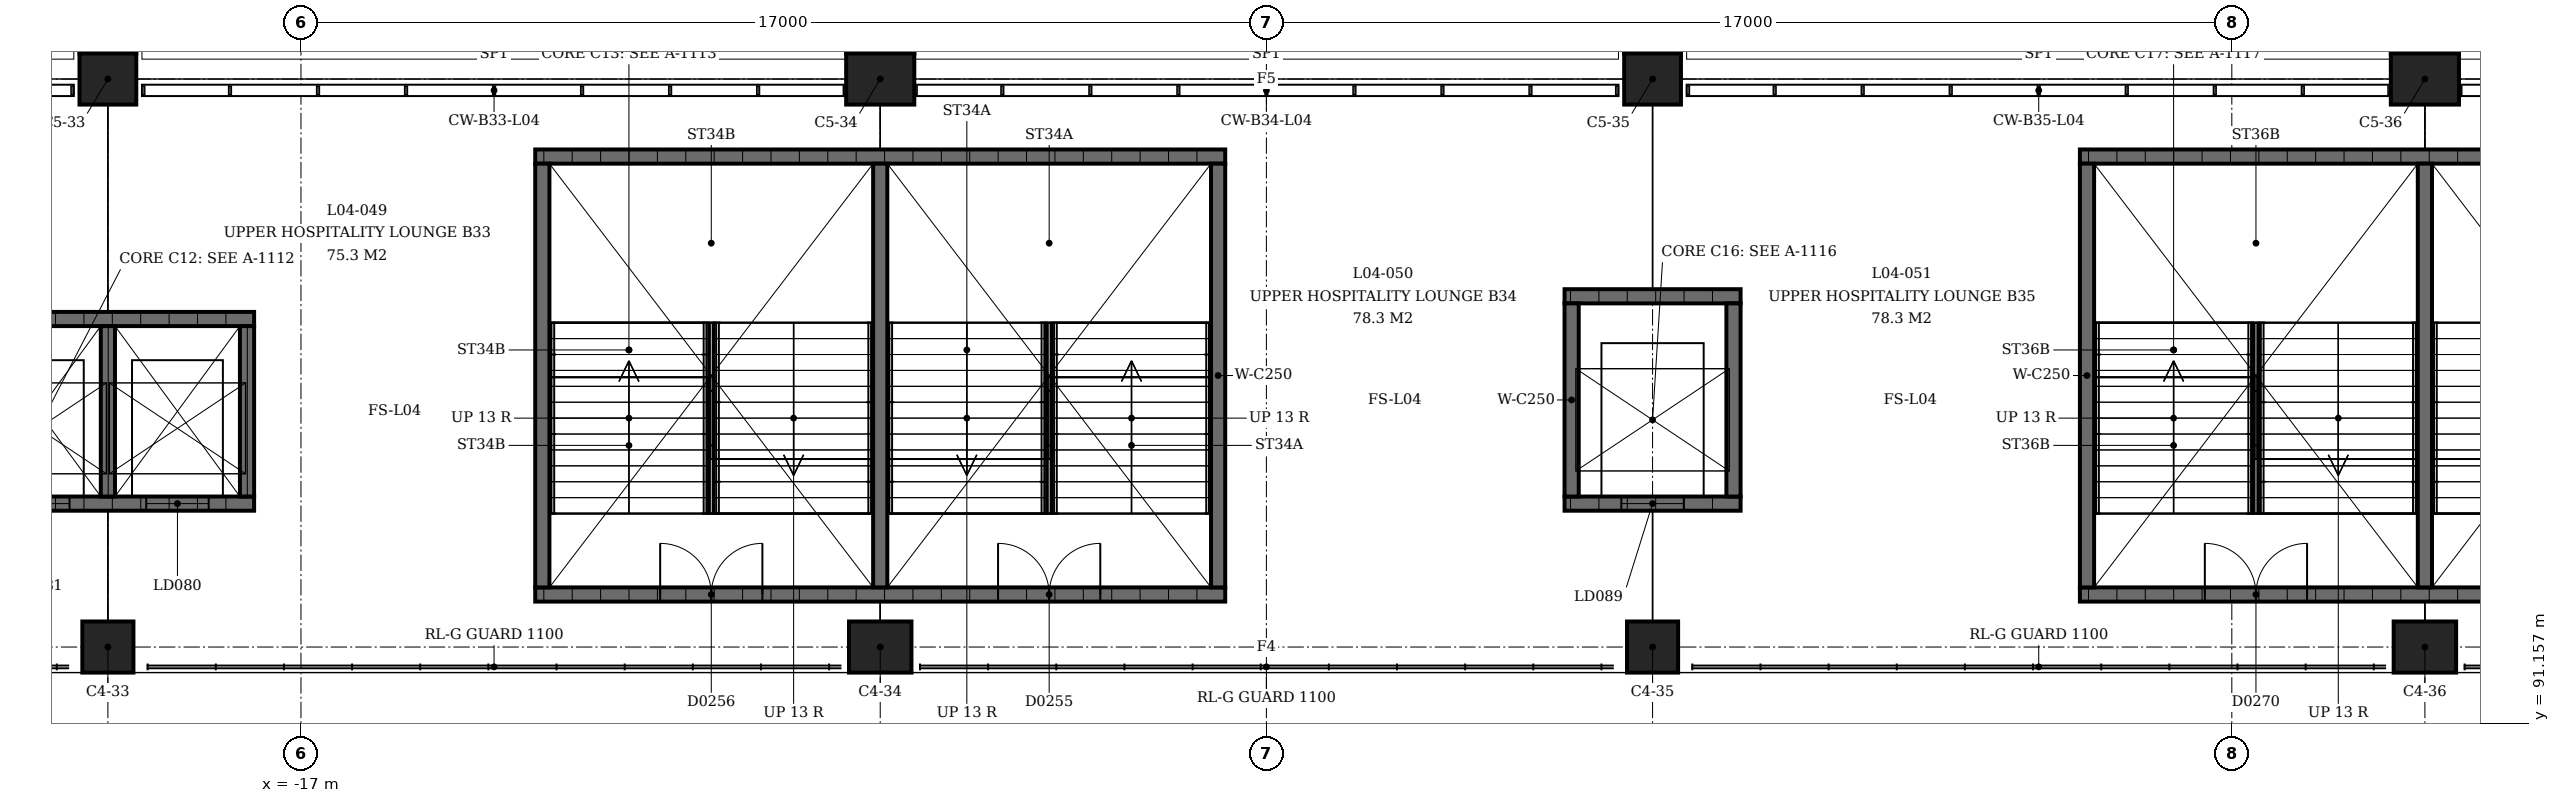
"""IFC4 building model, lengths in metres.
Left out: names, types, materials, properties, quantities, classifications, styles, units other than length and angle.
Written with IfcOpenShell. Run it as: python <this file> out.ifc"""

import sys

from ifc_helpers import new_model, si_unit, direction, frame, frame_2d, origin, origin_2d, place, context, subcontext, project, spatial, rectangle, extrude, element, fill, save


model = new_model("IFC4")
c1 = context("Model", 3, precision=1e-05, world=origin(), true_north=direction((0.0, 1.0)))
c2 = subcontext(c1, "Body", "Model", "MODEL_VIEW")
j1 = project(units=[si_unit("LENGTHUNIT", "METRE"), si_unit("PLANEANGLEUNIT", "RADIAN")], contexts=[c1])
p1 = place(None, origin())
s1 = spatial("IfcSite", under=j1, at=p1, CompositionType="ELEMENT")
p2 = place(p1, origin())
s2 = spatial("IfcBuilding", under=s1, at=p2, CompositionType="ELEMENT")
p3 = place(p2, frame((0.0, 0.0, 18.0)))
s3 = spatial("IfcBuildingStorey", under=s2, at=p3, CompositionType="ELEMENT", Elevation=18.0)
p4 = place(p3, frame((-20.4, 92.5, 0.0), z_axis=(0.0, 0.0, 1.0), x_axis=(-1.0, 0.0, 0.0)))
e1 = element("IfcColumn", 1, at=p4, inside=s3, PredefinedType="COLUMN", context=c2, shape_type="SweptSolid", body=[
    extrude(rectangle(XDim=0.9, YDim=0.9, at=origin_2d()), origin(), (0.0, 0.0, 1.0), 4.5),
])
p5 = place(p3, frame((-20.4, 102.5, 0.0), z_axis=(0.0, 0.0, 1.0), x_axis=(-1.0, 0.0, 0.0)))
e2 = element("IfcColumn", 2, at=p5, inside=s3, PredefinedType="COLUMN", context=c2, shape_type="SweptSolid", body=[
    extrude(rectangle(XDim=1.0, YDim=0.9, at=origin_2d()), origin(), (0.0, 0.0, 1.0), 4.5),
])
p6 = place(p3, frame((-6.8, 92.5, 0.0), z_axis=(0.0, 0.0, 1.0), x_axis=(-1.0, 0.0, 0.0)))
e3 = element("IfcColumn", 3, at=p6, inside=s3, PredefinedType="COLUMN", context=c2, shape_type="SweptSolid", body=[
    extrude(rectangle(XDim=1.1, YDim=0.9, at=origin_2d()), origin(), (0.0, 0.0, 1.0), 4.5),
])
p7 = place(p3, frame((-6.8, 102.5, 0.0), z_axis=(0.0, 0.0, 1.0), x_axis=(-1.0, 0.0, 0.0)))
e4 = element("IfcColumn", 4, at=p7, inside=s3, PredefinedType="COLUMN", context=c2, shape_type="SweptSolid", body=[
    extrude(rectangle(XDim=1.2, YDim=0.9, at=origin_2d()), origin(), (0.0, 0.0, 1.0), 4.5),
])
p8 = place(p3, frame((6.8, 92.5, 0.0), z_axis=(0.0, 0.0, 1.0), x_axis=(-1.0, 0.0, 0.0)))
e5 = element("IfcColumn", 5, at=p8, inside=s3, PredefinedType="COLUMN", context=c2, shape_type="SweptSolid", body=[
    extrude(rectangle(XDim=0.9, YDim=0.9, at=origin_2d()), origin(), (0.0, 0.0, 1.0), 4.5),
])
p9 = place(p3, frame((6.8, 102.5, 0.0), z_axis=(0.0, 0.0, 1.0), x_axis=(-1.0, 0.0, 0.0)))
e6 = element("IfcColumn", 6, at=p9, inside=s3, PredefinedType="COLUMN", context=c2, shape_type="SweptSolid", body=[
    extrude(rectangle(XDim=1.0, YDim=0.9, at=origin_2d()), origin(), (0.0, 0.0, 1.0), 4.5),
])
p10 = place(p3, frame((20.4, 92.5, 0.0), z_axis=(0.0, 0.0, 1.0), x_axis=(-1.0, 0.0, 0.0)))
e7 = element("IfcColumn", 7, at=p10, inside=s3, PredefinedType="COLUMN", context=c2, shape_type="SweptSolid", body=[
    extrude(rectangle(XDim=1.1, YDim=0.9, at=origin_2d()), origin(), (0.0, 0.0, 1.0), 4.5),
])
p11 = place(p3, frame((20.4, 102.5, 0.0), z_axis=(0.0, 0.0, 1.0), x_axis=(-1.0, 0.0, 0.0)))
e8 = element("IfcColumn", 8, at=p11, inside=s3, PredefinedType="COLUMN", context=c2, shape_type="SweptSolid", body=[
    extrude(rectangle(XDim=1.2, YDim=0.9, at=origin_2d()), origin(), (0.0, 0.0, 1.0), 4.5),
])
p12 = place(p3, frame((-0.725, 93.425, 0.0), z_axis=(0.0, 0.0, 1.0), x_axis=(-1.0, 0.0, 0.0)))
e9 = element("IfcWall", 9, at=p12, inside=s3, PredefinedType="SHEAR", context=c2, shape_type="SweptSolid", body=[
    extrude(rectangle(XDim=12.15, YDim=0.25, at=frame_2d((6.075, 0.0))), origin(), (0.0, 0.0, 1.0), 4.09),
])
p13 = place(p12, frame((2.2, 0.0, 0.0)))
e10 = element("IfcOpeningElement", 10, at=p13, cuts=e9, PredefinedType="OPENING", context=c2, shape_type="SweptSolid", body=[
    extrude(rectangle(XDim=1.8, YDim=2.1, at=frame_2d((0.9, 1.05))), frame((0.0, 0.125, 0.0), z_axis=(0.0, -1.0, 0.0), x_axis=(1.0, 0.0, 0.0)), (0.0, 0.0, 1.0), 0.25),
])
p14 = place(p12, frame((8.15, 0.0, 0.0)))
e11 = element("IfcOpeningElement", 11, at=p14, cuts=e9, PredefinedType="OPENING", context=c2, shape_type="SweptSolid", body=[
    extrude(rectangle(XDim=1.8, YDim=2.1, at=frame_2d((0.9, 1.05))), frame((0.0, 0.125, 0.0), z_axis=(0.0, -1.0, 0.0), x_axis=(1.0, 0.0, 0.0)), (0.0, 0.0, 1.0), 0.25),
])
p15 = place(p3, frame((-0.725, 101.135, 0.0), z_axis=(0.0, 0.0, 1.0), x_axis=(-1.0, 0.0, 0.0)))
e12 = element("IfcWall", 12, at=p15, inside=s3, PredefinedType="SHEAR", context=c2, shape_type="SweptSolid", body=[
    extrude(rectangle(XDim=12.15, YDim=0.25, at=frame_2d((6.075, 0.0))), origin(), (0.0, 0.0, 1.0), 4.09),
])
for number, where, z_axis, x_axis in (
    (13, (-0.85, 93.55, 0.0), (0.0, 0.0, 1.0), (0.0, 1.0, 0.0)),
    (14, (-12.75, 93.55, 0.0), (0.0, 0.0, 1.0), (0.0, 1.0, 0.0)),
    (15, (-6.8, 93.55, 0.0), (0.0, 0.0, 1.0), (0.0, 1.0, 0.0)),
):
    element("IfcWall", number, at=place(p3, frame(where, z_axis=z_axis, x_axis=x_axis)), inside=s3, PredefinedType="SHEAR", context=c2, shape_type="SweptSolid", body=[
        extrude(rectangle(XDim=7.46, YDim=0.25, at=frame_2d((3.73, 0.0))), origin(), (0.0, 0.0, 1.0), 4.09),
    ])
p16 = place(p3, frame((26.475, 93.425, 0.0), z_axis=(0.0, 0.0, 1.0), x_axis=(-1.0, 0.0, 0.0)))
e16 = element("IfcWall", 16, at=p16, inside=s3, PredefinedType="SHEAR", context=c2, shape_type="SweptSolid", body=[
    extrude(rectangle(XDim=12.15, YDim=0.25, at=frame_2d((6.075, 0.0))), origin(), (0.0, 0.0, 1.0), 4.09),
])
p17 = place(p16, frame((2.2, 0.0, 0.0)))
e17 = element("IfcOpeningElement", 17, at=p17, cuts=e16, PredefinedType="OPENING", context=c2, shape_type="SweptSolid", body=[
    extrude(rectangle(XDim=1.8, YDim=2.1, at=frame_2d((0.9, 1.05))), frame((0.0, 0.125, 0.0), z_axis=(0.0, -1.0, 0.0), x_axis=(1.0, 0.0, 0.0)), (0.0, 0.0, 1.0), 0.25),
])
p18 = place(p16, frame((8.15, 0.0, 0.0)))
e18 = element("IfcOpeningElement", 18, at=p18, cuts=e16, PredefinedType="OPENING", context=c2, shape_type="SweptSolid", body=[
    extrude(rectangle(XDim=1.8, YDim=2.1, at=frame_2d((0.9, 1.05))), frame((0.0, 0.125, 0.0), z_axis=(0.0, -1.0, 0.0), x_axis=(1.0, 0.0, 0.0)), (0.0, 0.0, 1.0), 0.25),
])
p19 = place(p3, frame((26.475, 101.135, 0.0), z_axis=(0.0, 0.0, 1.0), x_axis=(-1.0, 0.0, 0.0)))
e19 = element("IfcWall", 19, at=p19, inside=s3, PredefinedType="SHEAR", context=c2, shape_type="SweptSolid", body=[
    extrude(rectangle(XDim=12.15, YDim=0.25, at=frame_2d((6.075, 0.0))), origin(), (0.0, 0.0, 1.0), 4.09),
])
for number, where, z_axis, x_axis in (
    (20, (14.45, 93.55, 0.0), (0.0, 0.0, 1.0), (0.0, 1.0, 0.0)),
    (21, (20.4, 93.55, 0.0), (0.0, 0.0, 1.0), (0.0, 1.0, 0.0)),
):
    element("IfcWall", number, at=place(p3, frame(where, z_axis=z_axis, x_axis=x_axis)), inside=s3, PredefinedType="SHEAR", context=c2, shape_type="SweptSolid", body=[
        extrude(rectangle(XDim=7.46, YDim=0.25, at=frame_2d((3.73, 0.0))), origin(), (0.0, 0.0, 1.0), 4.09),
    ])
p20 = place(p3, frame((-17.825, 95.025, 0.0), z_axis=(0.0, 0.0, 1.0), x_axis=(-1.0, 0.0, 0.0)))
e22 = element("IfcWall", 22, at=p20, inside=s3, PredefinedType="SHEAR", context=c2, shape_type="SweptSolid", body=[
    extrude(rectangle(XDim=5.15, YDim=0.25, at=frame_2d((2.575, 0.0))), origin(), (0.0, 0.0, 1.0), 4.09),
])
p21 = place(p20, frame((0.8, 0.0, 0.0)))
e23 = element("IfcOpeningElement", 23, at=p21, cuts=e22, PredefinedType="OPENING", context=c2, shape_type="SweptSolid", body=[
    extrude(rectangle(XDim=1.1, YDim=2.1, at=frame_2d((0.55, 1.05))), frame((0.0, 0.125, 0.0), z_axis=(0.0, -1.0, 0.0), x_axis=(1.0, 0.0, 0.0)), (0.0, 0.0, 1.0), 0.25),
])
p22 = place(p20, frame((3.25, 0.0, 0.0)))
e24 = element("IfcOpeningElement", 24, at=p22, cuts=e22, PredefinedType="OPENING", context=c2, shape_type="SweptSolid", body=[
    extrude(rectangle(XDim=1.1, YDim=2.1, at=frame_2d((0.55, 1.05))), frame((0.0, 0.125, 0.0), z_axis=(0.0, -1.0, 0.0), x_axis=(1.0, 0.0, 0.0)), (0.0, 0.0, 1.0), 0.25),
])
p23 = place(p3, frame((-17.825, 98.275, 0.0), z_axis=(0.0, 0.0, 1.0), x_axis=(-1.0, 0.0, 0.0)))
e25 = element("IfcWall", 25, at=p23, inside=s3, PredefinedType="SHEAR", context=c2, shape_type="SweptSolid", body=[
    extrude(rectangle(XDim=5.15, YDim=0.25, at=frame_2d((2.575, 0.0))), origin(), (0.0, 0.0, 1.0), 4.09),
])
for number, where, z_axis, x_axis in (
    (26, (-17.95, 95.15, 0.0), (0.0, 0.0, 1.0), (0.0, 1.0, 0.0)),
    (27, (-20.4, 95.15, 0.0), (0.0, 0.0, 1.0), (0.0, 1.0, 0.0)),
):
    element("IfcWall", number, at=place(p3, frame(where, z_axis=z_axis, x_axis=x_axis)), inside=s3, PredefinedType="SHEAR", context=c2, shape_type="SweptSolid", body=[
        extrude(rectangle(XDim=3.0, YDim=0.25, at=frame_2d((1.5, 0.0))), origin(), (0.0, 0.0, 1.0), 4.09),
    ])
p24 = place(p3, frame((8.35, 95.025, 0.0), z_axis=(0.0, 0.0, 1.0), x_axis=(-1.0, 0.0, 0.0)))
e28 = element("IfcWall", 28, at=p24, inside=s3, PredefinedType="SHEAR", context=c2, shape_type="SweptSolid", body=[
    extrude(rectangle(XDim=3.1, YDim=0.25, at=frame_2d((1.55, 0.0))), origin(), (0.0, 0.0, 1.0), 4.09),
])
p25 = place(p24, frame((1.0, 0.0, 0.0)))
e29 = element("IfcOpeningElement", 29, at=p25, cuts=e28, PredefinedType="OPENING", context=c2, shape_type="SweptSolid", body=[
    extrude(rectangle(XDim=1.1, YDim=2.1, at=frame_2d((0.55, 1.05))), frame((0.0, 0.125, 0.0), z_axis=(0.0, -1.0, 0.0), x_axis=(1.0, 0.0, 0.0)), (0.0, 0.0, 1.0), 0.25),
])
p26 = place(p3, frame((8.35, 98.675, 0.0), z_axis=(0.0, 0.0, 1.0), x_axis=(-1.0, 0.0, 0.0)))
e30 = element("IfcWall", 30, at=p26, inside=s3, PredefinedType="SHEAR", context=c2, shape_type="SweptSolid", body=[
    extrude(rectangle(XDim=3.1, YDim=0.25, at=frame_2d((1.55, 0.0))), origin(), (0.0, 0.0, 1.0), 4.09),
])
for number, where, z_axis, x_axis in (
    (31, (8.225, 95.15, 0.0), (0.0, 0.0, 1.0), (0.0, 1.0, 0.0)),
    (32, (5.375, 95.15, 0.0), (0.0, 0.0, 1.0), (0.0, 1.0, 0.0)),
):
    element("IfcWall", number, at=place(p3, frame(where, z_axis=z_axis, x_axis=x_axis)), inside=s3, PredefinedType="SHEAR", context=c2, shape_type="SweptSolid", body=[
        extrude(rectangle(XDim=3.4, YDim=0.25, at=frame_2d((1.7, 0.0))), origin(), (0.0, 0.0, 1.0), 4.09),
    ])
p27 = place(p13, origin())
e33 = element("IfcDoor", 33, at=p27, inside=s3, OperationType="DOUBLE_DOOR_SINGLE_SWING", PredefinedType="DOOR", context=c2, shape_type="SweptSolid", body=[
    extrude(rectangle(XDim=1.8, YDim=2.1, at=frame_2d((0.9, 1.05))), frame((0.0, 0.025, 0.0), z_axis=(0.0, -1.0, 0.0), x_axis=(1.0, 0.0, 0.0)), (0.0, 0.0, 1.0), 0.05),
])
fill(e10, e33)
p28 = place(p14, origin())
e34 = element("IfcDoor", 34, at=p28, inside=s3, OperationType="DOUBLE_DOOR_SINGLE_SWING", PredefinedType="DOOR", context=c2, shape_type="SweptSolid", body=[
    extrude(rectangle(XDim=1.8, YDim=2.1, at=frame_2d((0.9, 1.05))), frame((0.0, 0.025, 0.0), z_axis=(0.0, -1.0, 0.0), x_axis=(1.0, 0.0, 0.0)), (0.0, 0.0, 1.0), 0.05),
])
fill(e11, e34)
p29 = place(p18, origin())
e35 = element("IfcDoor", 35, at=p29, inside=s3, OperationType="DOUBLE_DOOR_SINGLE_SWING", PredefinedType="DOOR", context=c2, shape_type="SweptSolid", body=[
    extrude(rectangle(XDim=1.8, YDim=2.1, at=frame_2d((0.9, 1.05))), frame((0.0, 0.025, 0.0), z_axis=(0.0, -1.0, 0.0), x_axis=(1.0, 0.0, 0.0)), (0.0, 0.0, 1.0), 0.05),
])
fill(e18, e35)
p30 = place(p21, origin())
e36 = element("IfcDoor", 36, at=p30, inside=s3, OperationType="SLIDING_TO_LEFT", PredefinedType="DOOR", context=c2, shape_type="SweptSolid", body=[
    extrude(rectangle(XDim=1.1, YDim=2.1, at=frame_2d((0.55, 1.05))), frame((0.0, 0.025, 0.0), z_axis=(0.0, -1.0, 0.0), x_axis=(1.0, 0.0, 0.0)), (0.0, 0.0, 1.0), 0.05),
])
fill(e23, e36)
p31 = place(p22, origin())
e37 = element("IfcDoor", 37, at=p31, inside=s3, OperationType="SLIDING_TO_LEFT", PredefinedType="DOOR", context=c2, shape_type="SweptSolid", body=[
    extrude(rectangle(XDim=1.1, YDim=2.1, at=frame_2d((0.55, 1.05))), frame((0.0, 0.025, 0.0), z_axis=(0.0, -1.0, 0.0), x_axis=(1.0, 0.0, 0.0)), (0.0, 0.0, 1.0), 0.05),
])
fill(e24, e37)
p32 = place(p25, origin())
e38 = element("IfcDoor", 38, at=p32, inside=s3, OperationType="SLIDING_TO_LEFT", PredefinedType="DOOR", context=c2, shape_type="SweptSolid", body=[
    extrude(rectangle(XDim=1.1, YDim=2.1, at=frame_2d((0.55, 1.05))), frame((0.0, 0.025, 0.0), z_axis=(0.0, -1.0, 0.0), x_axis=(1.0, 0.0, 0.0)), (0.0, 0.0, 1.0), 0.05),
])
fill(e29, e38)
save(model, sys.argv[1])
